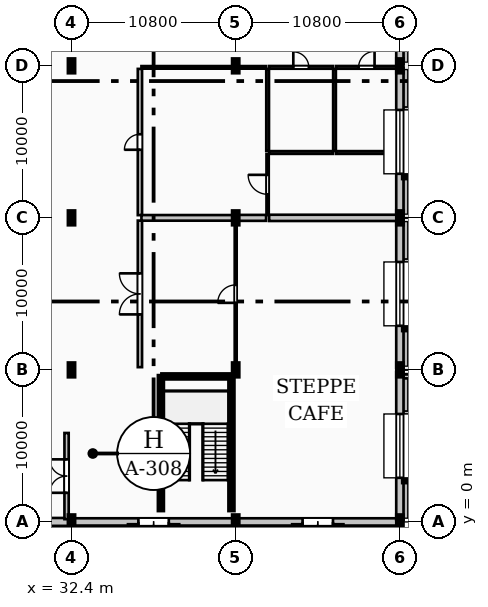
"""IFC4 building model, lengths in metres.
Left out: names, types, materials, properties, quantities, classifications, styles, units other than length and angle.
Written with IfcOpenShell. Run it as: python <this file> out.ifc"""

import sys

from ifc_helpers import new_model, si_unit, direction, frame, frame_2d, origin, origin_2d, place, context, subcontext, project, spatial, rectangle, i_section, extrude, element, fill, save


model = new_model("IFC4")
c1 = context("Model", 3, precision=1e-05, world=origin(), true_north=direction((0.0, 1.0)))
c2 = subcontext(c1, "Body", "Model", "MODEL_VIEW")
j1 = project(units=[si_unit("LENGTHUNIT", "METRE"), si_unit("PLANEANGLEUNIT", "RADIAN")], contexts=[c1])
p1 = place(None, origin())
s1 = spatial("IfcSite", under=j1, at=p1, CompositionType="ELEMENT")
p2 = place(p1, origin())
s2 = spatial("IfcBuilding", under=s1, at=p2, CompositionType="ELEMENT")
p3 = place(p2, origin())
s3 = spatial("IfcBuildingStorey", under=s2, at=p3, CompositionType="ELEMENT", Elevation=0.0)
for number, where, z_axis, x_axis in (
    (1, (32.4, 0.0, 0.0), (0.0, 0.0, 1.0), (1.0, 0.0, 0.0)),
    (2, (32.4, 10.0, 0.0), (0.0, 0.0, 1.0), (1.0, 0.0, 0.0)),
    (3, (32.4, 20.0, 0.0), (0.0, 0.0, 1.0), (1.0, 0.0, 0.0)),
    (4, (32.4, 30.0, 0.0), (0.0, 0.0, 1.0), (1.0, 0.0, 0.0)),
    (5, (43.2, 0.0, 0.0), (0.0, 0.0, 1.0), (1.0, 0.0, 0.0)),
    (6, (43.2, 10.0, 0.0), (0.0, 0.0, 1.0), (1.0, 0.0, 0.0)),
    (7, (43.2, 20.0, 0.0), (0.0, 0.0, 1.0), (1.0, 0.0, 0.0)),
    (8, (43.2, 30.0, 0.0), (0.0, 0.0, 1.0), (1.0, 0.0, 0.0)),
    (9, (54.0, 0.0, 0.0), (0.0, 0.0, 1.0), (1.0, 0.0, 0.0)),
    (10, (54.0, 10.0, 0.0), (0.0, 0.0, 1.0), (1.0, 0.0, 0.0)),
    (11, (54.0, 20.0, 0.0), (0.0, 0.0, 1.0), (1.0, 0.0, 0.0)),
    (12, (54.0, 30.0, 0.0), (0.0, 0.0, 1.0), (1.0, 0.0, 0.0)),
):
    element("IfcColumn", number, at=place(p3, frame(where, z_axis=z_axis, x_axis=x_axis)), inside=s3, PredefinedType="COLUMN", context=c2, shape_type="SweptSolid", body=[
        extrude(i_section(OverallWidth=0.3, OverallDepth=0.8, WebThickness=0.018, FlangeThickness=0.033, FilletRadius=0.03, at=origin_2d()), origin(), (0.0, 0.0, 1.0), 4.8),
    ])
for number, where, z_axis, x_axis in (
    (13, (0.2, -0.43, -1.38), (0.0, 0.0, 1.0), (1.0, 0.0, 0.0)),
    (14, (54.2, 9.57, -1.38), (0.0, 0.0, 1.0), (1.0, 0.0, 0.0)),
):
    element("IfcWall", number, at=place(p3, frame(where, z_axis=z_axis, x_axis=x_axis)), inside=s3, PredefinedType="PARAPET", context=c2, shape_type="SweptSolid", body=[
        extrude(rectangle(XDim=53.6, YDim=0.26, at=frame_2d((26.8, 0.0))), origin(), (0.0, 0.0, 1.0), 1.36),
    ])
p4 = place(p3, frame((21.745, 0.0, 0.0), z_axis=(0.0, 0.0, 1.0), x_axis=(1.0, 0.0, 0.0)))
e15 = element("IfcWall", 15, at=p4, inside=s3, PredefinedType="SOLIDWALL", context=c2, shape_type="SweptSolid", body=[
    extrude(rectangle(XDim=10.51, YDim=0.52, at=frame_2d((5.255, 0.0))), origin(), (0.0, 0.0, 1.0), 4.069),
])
p5 = place(p3, frame((32.545, 0.0, 0.0), z_axis=(0.0, 0.0, 1.0), x_axis=(1.0, 0.0, 0.0)))
e16 = element("IfcWall", 16, at=p5, inside=s3, PredefinedType="STANDARD", context=c2, shape_type="SweptSolid", body=[
    extrude(rectangle(XDim=10.51, YDim=0.48, at=frame_2d((5.255, 0.0))), origin(), (0.0, 0.0, 1.0), 4.069),
])
p6 = place(p5, frame((4.255, 0.0, 0.0)))
e17 = element("IfcOpeningElement", 17, at=p6, cuts=e16, PredefinedType="OPENING", context=c2, shape_type="SweptSolid", body=[
    extrude(rectangle(XDim=2.0, YDim=2.3, at=frame_2d((1.0, 1.15))), frame((0.0, 0.25, 0.0), z_axis=(0.0, -1.0, 0.0), x_axis=(1.0, 0.0, 0.0)), (0.0, 0.0, 1.0), 0.5),
])
p7 = place(p3, frame((43.345, 0.0, 0.0), z_axis=(0.0, 0.0, 1.0), x_axis=(1.0, 0.0, 0.0)))
e18 = element("IfcWall", 18, at=p7, inside=s3, PredefinedType="STANDARD", context=c2, shape_type="SweptSolid", body=[
    extrude(rectangle(XDim=10.51, YDim=0.48, at=frame_2d((5.255, 0.0))), origin(), (0.0, 0.0, 1.0), 4.069),
])
p8 = place(p7, frame((4.255, 0.0, 0.0)))
e19 = element("IfcOpeningElement", 19, at=p8, cuts=e18, PredefinedType="OPENING", context=c2, shape_type="SweptSolid", body=[
    extrude(rectangle(XDim=2.0, YDim=2.3, at=frame_2d((1.0, 1.15))), frame((0.0, 0.25, 0.0), z_axis=(0.0, -1.0, 0.0), x_axis=(1.0, 0.0, 0.0)), (0.0, 0.0, 1.0), 0.5),
])
p9 = place(p3, frame((54.0, 0.145, 0.0), z_axis=(0.0, 0.0, 1.0), x_axis=(0.0, 1.0, 0.0)))
e20 = element("IfcWall", 20, at=p9, inside=s3, PredefinedType="STANDARD", context=c2, shape_type="SweptSolid", body=[
    extrude(rectangle(XDim=9.71, YDim=0.48, at=frame_2d((4.855, 0.0))), origin(), (0.0, 0.0, 1.0), 4.56),
])
p10 = place(p9, frame((2.755, 0.0, 0.9)))
e21 = element("IfcOpeningElement", 21, at=p10, cuts=e20, PredefinedType="OPENING", context=c2, shape_type="SweptSolid", body=[
    extrude(rectangle(XDim=4.2, YDim=2.7, at=frame_2d((2.1, 1.35))), frame((0.0, 0.25, 0.0), z_axis=(0.0, -1.0, 0.0), x_axis=(1.0, 0.0, 0.0)), (0.0, 0.0, 1.0), 0.5),
])
p11 = place(p3, frame((54.0, 10.145, 0.0), z_axis=(0.0, 0.0, 1.0), x_axis=(0.0, 1.0, 0.0)))
e22 = element("IfcWall", 22, at=p11, inside=s3, PredefinedType="STANDARD", context=c2, shape_type="SweptSolid", body=[
    extrude(rectangle(XDim=9.71, YDim=0.48, at=frame_2d((4.855, 0.0))), origin(), (0.0, 0.0, 1.0), 4.56),
])
p12 = place(p11, frame((2.755, 0.0, 0.9)))
e23 = element("IfcOpeningElement", 23, at=p12, cuts=e22, PredefinedType="OPENING", context=c2, shape_type="SweptSolid", body=[
    extrude(rectangle(XDim=4.2, YDim=2.7, at=frame_2d((2.1, 1.35))), frame((0.0, 0.25, 0.0), z_axis=(0.0, -1.0, 0.0), x_axis=(1.0, 0.0, 0.0)), (0.0, 0.0, 1.0), 0.5),
])
p13 = place(p3, frame((54.0, 20.145, 0.0), z_axis=(0.0, 0.0, 1.0), x_axis=(0.0, 1.0, 0.0)))
e24 = element("IfcWall", 24, at=p13, inside=s3, PredefinedType="STANDARD", context=c2, shape_type="SweptSolid", body=[
    extrude(rectangle(XDim=9.71, YDim=0.48, at=frame_2d((4.855, 0.0))), origin(), (0.0, 0.0, 1.0), 4.56),
])
p14 = place(p13, frame((2.755, 0.0, 0.9)))
e25 = element("IfcOpeningElement", 25, at=p14, cuts=e24, PredefinedType="OPENING", context=c2, shape_type="SweptSolid", body=[
    extrude(rectangle(XDim=4.2, YDim=2.7, at=frame_2d((2.1, 1.35))), frame((0.0, 0.25, 0.0), z_axis=(0.0, -1.0, 0.0), x_axis=(1.0, 0.0, 0.0)), (0.0, 0.0, 1.0), 0.5),
])
p15 = place(p3, frame((54.0, 30.145, 0.0), z_axis=(0.0, 0.0, 1.0), x_axis=(0.0, 1.0, 0.0)))
e26 = element("IfcWall", 26, at=p15, inside=s3, PredefinedType="STANDARD", context=c2, shape_type="SweptSolid", body=[
    extrude(rectangle(XDim=9.71, YDim=0.48, at=frame_2d((4.855, 0.0))), origin(), (0.0, 0.0, 1.0), 4.56),
])
p16 = place(p15, frame((2.755, 0.0, 0.9)))
e27 = element("IfcOpeningElement", 27, at=p16, cuts=e26, PredefinedType="OPENING", context=c2, shape_type="SweptSolid", body=[
    extrude(rectangle(XDim=4.2, YDim=2.7, at=frame_2d((2.1, 1.35))), frame((0.0, 0.25, 0.0), z_axis=(0.0, -1.0, 0.0), x_axis=(1.0, 0.0, 0.0)), (0.0, 0.0, 1.0), 0.5),
])
for number, where, z_axis, x_axis in (
    (28, (38.28, 0.8, 0.0), (0.0, 0.0, 1.0), (0.0, 1.0, 0.0)),
    (29, (42.92, 0.8, 0.0), (0.0, 0.0, 1.0), (0.0, 1.0, 0.0)),
):
    element("IfcWall", number, at=place(p3, frame(where, z_axis=z_axis, x_axis=x_axis)), inside=s3, PredefinedType="SHEAR", context=c2, shape_type="SweptSolid", body=[
        extrude(rectangle(XDim=8.77, YDim=0.22, at=frame_2d((4.385, 0.0))), origin(), (0.0, 0.0, 1.0), 4.56),
    ])
p17 = place(p3, frame((38.4, 9.57, 0.0), z_axis=(0.0, 0.0, 1.0), x_axis=(1.0, 0.0, 0.0)))
e30 = element("IfcWall", 30, at=p17, inside=s3, PredefinedType="SHEAR", context=c2, shape_type="SweptSolid", body=[
    extrude(rectangle(XDim=4.4, YDim=0.22, at=frame_2d((2.2, 0.0))), origin(), (0.0, 0.0, 1.0), 4.56),
])
p18 = place(p3, frame((45.4, 29.9, 0.0), z_axis=(0.0, 0.0, 1.0), x_axis=(1.0, 0.0, 0.0)))
e31 = element("IfcWall", 31, at=p18, inside=s3, PredefinedType="PLUMBINGWALL", context=c2, shape_type="SweptSolid", body=[
    extrude(rectangle(XDim=4.2, YDim=0.18, at=frame_2d((2.1, 0.0))), origin(), (0.0, 0.0, 1.0), 4.069),
])
p19 = place(p18, frame((1.59, 0.0, 0.0)))
e32 = element("IfcOpeningElement", 32, at=p19, cuts=e31, PredefinedType="OPENING", context=c2, shape_type="SweptSolid", body=[
    extrude(rectangle(XDim=1.02, YDim=2.15, at=frame_2d((0.51, 1.075))), frame((0.0, 0.1, 0.0), z_axis=(0.0, -1.0, 0.0), x_axis=(1.0, 0.0, 0.0)), (0.0, 0.0, 1.0), 0.2),
])
p20 = place(p3, frame((49.8, 29.9, 0.0), z_axis=(0.0, 0.0, 1.0), x_axis=(1.0, 0.0, 0.0)))
e33 = element("IfcWall", 33, at=p20, inside=s3, PredefinedType="PLUMBINGWALL", context=c2, shape_type="SweptSolid", body=[
    extrude(rectangle(XDim=4.02, YDim=0.18, at=frame_2d((2.01, 0.0))), origin(), (0.0, 0.0, 1.0), 4.069),
])
p21 = place(p20, frame((1.485, 0.0, 0.0)))
e34 = element("IfcOpeningElement", 34, at=p21, cuts=e33, PredefinedType="OPENING", context=c2, shape_type="SweptSolid", body=[
    extrude(rectangle(XDim=1.05, YDim=2.15, at=frame_2d((0.525, 1.075))), frame((0.0, 0.1, 0.0), z_axis=(0.0, -1.0, 0.0), x_axis=(1.0, 0.0, 0.0)), (0.0, 0.0, 1.0), 0.2),
])
p22 = place(p3, frame((32.075, 0.18, 0.0), z_axis=(0.0, 0.0, 1.0), x_axis=(0.0, 1.0, 0.0)))
e35 = element("IfcWall", 35, at=p22, inside=s3, PredefinedType="SOLIDWALL", context=c2, shape_type="SweptSolid", body=[
    extrude(rectangle(XDim=5.67, YDim=0.28, at=frame_2d((2.835, 0.0))), origin(), (0.0, 0.0, 1.0), 4.52),
])
p23 = place(p22, frame((1.735, 0.0, 0.0)))
e36 = element("IfcOpeningElement", 36, at=p23, cuts=e35, PredefinedType="OPENING", context=c2, shape_type="SweptSolid", body=[
    extrude(rectangle(XDim=2.2, YDim=2.5, at=frame_2d((1.1, 1.25))), frame((0.0, 0.15, 0.0), z_axis=(0.0, -1.0, 0.0), x_axis=(1.0, 0.0, 0.0)), (0.0, 0.0, 1.0), 0.3),
])
p24 = place(p3, frame((36.9, 10.18, 0.0), z_axis=(0.0, 0.0, 1.0), x_axis=(0.0, 1.0, 0.0)))
e37 = element("IfcWall", 37, at=p24, inside=s3, PredefinedType="SOLIDWALL", context=c2, shape_type="SweptSolid", body=[
    extrude(rectangle(XDim=9.64, YDim=0.28, at=frame_2d((4.82, 0.0))), origin(), (0.0, 0.0, 1.0), 4.52),
])
p25 = place(p24, frame((3.47, 0.0, 0.0)))
e38 = element("IfcOpeningElement", 38, at=p25, cuts=e37, PredefinedType="OPENING", context=c2, shape_type="SweptSolid", body=[
    extrude(rectangle(XDim=2.7, YDim=2.85, at=frame_2d((1.35, 1.425))), frame((0.0, 0.15, 0.0), z_axis=(0.0, -1.0, 0.0), x_axis=(1.0, 0.0, 0.0)), (0.0, 0.0, 1.0), 0.3),
])
p26 = place(p3, frame((36.9, 20.18, 0.0), z_axis=(0.0, 0.0, 1.0), x_axis=(0.0, 1.0, 0.0)))
e39 = element("IfcWall", 39, at=p26, inside=s3, PredefinedType="SOLIDWALL", context=c2, shape_type="SweptSolid", body=[
    extrude(rectangle(XDim=9.62, YDim=0.28, at=frame_2d((4.81, 0.0))), origin(), (0.0, 0.0, 1.0), 4.52),
])
p27 = place(p26, frame((4.3, 0.0, 0.0)))
e40 = element("IfcOpeningElement", 40, at=p27, cuts=e39, PredefinedType="OPENING", context=c2, shape_type="SweptSolid", body=[
    extrude(rectangle(XDim=1.02, YDim=2.18, at=frame_2d((0.51, 1.09))), frame((0.0, 0.15, 0.0), z_axis=(0.0, -1.0, 0.0), x_axis=(1.0, 0.0, 0.0)), (0.0, 0.0, 1.0), 0.3),
])
p28 = place(p3, frame((43.2, 10.18, 0.0), z_axis=(0.0, 0.0, 1.0), x_axis=(0.0, 1.0, 0.0)))
e41 = element("IfcWall", 41, at=p28, inside=s3, PredefinedType="PARTITIONING", context=c2, shape_type="SweptSolid", body=[
    extrude(rectangle(XDim=9.64, YDim=0.13, at=frame_2d((4.82, 0.0))), origin(), (0.0, 0.0, 1.0), 4.06),
])
p29 = place(p28, frame((4.23, 0.0, 0.0)))
e42 = element("IfcOpeningElement", 42, at=p29, cuts=e41, PredefinedType="OPENING", context=c2, shape_type="SweptSolid", body=[
    extrude(rectangle(XDim=1.18, YDim=2.28, at=frame_2d((0.59, 1.14))), frame((0.0, 0.075, 0.0), z_axis=(0.0, -1.0, 0.0), x_axis=(1.0, 0.0, 0.0)), (0.0, 0.0, 1.0), 0.15),
])
p30 = place(p3, frame((45.3, 20.18, 0.0), z_axis=(0.0, 0.0, 1.0), x_axis=(0.0, 1.0, 0.0)))
e43 = element("IfcWall", 43, at=p30, inside=s3, PredefinedType="PARTITIONING", context=c2, shape_type="SweptSolid", body=[
    extrude(rectangle(XDim=4.02, YDim=0.15, at=frame_2d((2.01, 0.0))), origin(), (0.0, 0.0, 1.0), 4.52),
])
p31 = place(p30, frame((1.37, 0.0, 0.0)))
e44 = element("IfcOpeningElement", 44, at=p31, cuts=e43, PredefinedType="OPENING", context=c2, shape_type="SweptSolid", body=[
    extrude(rectangle(XDim=1.28, YDim=2.32, at=frame_2d((0.64, 1.16))), frame((0.0, 0.085, 0.0), z_axis=(0.0, -1.0, 0.0), x_axis=(1.0, 0.0, 0.0)), (0.0, 0.0, 1.0), 0.17),
])
p32 = place(p3, frame((37.0, 20.0, 0.0), z_axis=(0.0, 0.0, 1.0), x_axis=(1.0, 0.0, 0.0)))
e45 = element("IfcWall", 45, at=p32, inside=s3, PredefinedType="PARTITIONING", context=c2, shape_type="SweptSolid", body=[
    extrude(rectangle(XDim=6.02, YDim=0.37, at=frame_2d((3.01, 0.0))), origin(), (0.0, 0.0, 1.0), 4.069),
])
p33 = place(p3, frame((43.38, 20.0, 0.0), z_axis=(0.0, 0.0, 1.0), x_axis=(1.0, 0.0, 0.0)))
e46 = element("IfcWall", 46, at=p33, inside=s3, PredefinedType="PARTITIONING", context=c2, shape_type="SweptSolid", body=[
    extrude(rectangle(XDim=1.82, YDim=0.39, at=frame_2d((0.91, 0.0))), origin(), (0.0, 0.0, 1.0), 4.069),
])
p34 = place(p3, frame((45.4, 20.0, 0.0), z_axis=(0.0, 0.0, 1.0), x_axis=(1.0, 0.0, 0.0)))
e47 = element("IfcWall", 47, at=p34, inside=s3, PredefinedType="PARTITIONING", context=c2, shape_type="SweptSolid", body=[
    extrude(rectangle(XDim=8.42, YDim=0.41, at=frame_2d((4.21, 0.0))), origin(), (0.0, 0.0, 1.0), 4.069),
])
p35 = place(p3, frame((45.4, 24.3, 0.0), z_axis=(0.0, 0.0, 1.0), x_axis=(1.0, 0.0, 0.0)))
e48 = element("IfcWall", 48, at=p35, inside=s3, PredefinedType="PLUMBINGWALL", context=c2, shape_type="SweptSolid", body=[
    extrude(rectangle(XDim=4.2, YDim=0.18, at=frame_2d((2.1, 0.0))), origin(), (0.0, 0.0, 1.0), 4.52),
])
p36 = place(p3, frame((49.8, 24.3, 0.0), z_axis=(0.0, 0.0, 1.0), x_axis=(1.0, 0.0, 0.0)))
e49 = element("IfcWall", 49, at=p36, inside=s3, PredefinedType="PLUMBINGWALL", context=c2, shape_type="SweptSolid", body=[
    extrude(rectangle(XDim=4.02, YDim=0.18, at=frame_2d((2.01, 0.0))), origin(), (0.0, 0.0, 1.0), 4.52),
])
p37 = place(p3, frame((37.0, 29.9, 0.0), z_axis=(0.0, 0.0, 1.0), x_axis=(1.0, 0.0, 0.0)))
e50 = element("IfcWall", 50, at=p37, inside=s3, PredefinedType="PARTITIONING", context=c2, shape_type="SweptSolid", body=[
    extrude(rectangle(XDim=6.0, YDim=0.17, at=frame_2d((3.0, 0.0))), origin(), (0.0, 0.0, 1.0), 4.069),
])
p38 = place(p3, frame((43.4, 29.9, 0.0), z_axis=(0.0, 0.0, 1.0), x_axis=(1.0, 0.0, 0.0)))
e51 = element("IfcWall", 51, at=p38, inside=s3, PredefinedType="PARTITIONING", context=c2, shape_type="SweptSolid", body=[
    extrude(rectangle(XDim=1.8, YDim=0.17, at=frame_2d((0.9, 0.0))), origin(), (0.0, 0.0, 1.0), 4.069),
])
for number, where, z_axis, x_axis in (
    (52, (45.3, 24.4, 0.0), (0.0, 0.0, 1.0), (0.0, 1.0, 0.0)),
    (53, (49.7, 24.4, 0.0), (0.0, 0.0, 1.0), (0.0, 1.0, 0.0)),
):
    element("IfcWall", number, at=place(p3, frame(where, z_axis=z_axis, x_axis=x_axis)), inside=s3, PredefinedType="PLUMBINGWALL", context=c2, shape_type="SweptSolid", body=[
        extrude(rectangle(XDim=5.4, YDim=0.18, at=frame_2d((2.7, 0.0))), origin(), (0.0, 0.0, 1.0), 4.52),
    ])
p39 = place(p6, frame((2.0, 0.0, 0.0), z_axis=(0.0, 0.0, 1.0), x_axis=(-1.0, 0.0, 0.0)))
e54 = element("IfcDoor", 54, at=p39, inside=s3, OperationType="DOUBLE_DOOR_SINGLE_SWING", PredefinedType="DOOR", context=c2, shape_type="SweptSolid", body=[
    extrude(rectangle(XDim=2.0, YDim=2.3, at=frame_2d((1.0, 1.15))), frame((0.0, 0.025, 0.0), z_axis=(0.0, -1.0, 0.0), x_axis=(1.0, 0.0, 0.0)), (0.0, 0.0, 1.0), 0.05),
])
fill(e17, e54)
p40 = place(p8, frame((2.0, 0.0, 0.0), z_axis=(0.0, 0.0, 1.0), x_axis=(-1.0, 0.0, 0.0)))
e55 = element("IfcDoor", 55, at=p40, inside=s3, OperationType="DOUBLE_DOOR_SINGLE_SWING", PredefinedType="DOOR", context=c2, shape_type="SweptSolid", body=[
    extrude(rectangle(XDim=2.0, YDim=2.3, at=frame_2d((1.0, 1.15))), frame((0.0, 0.025, 0.0), z_axis=(0.0, -1.0, 0.0), x_axis=(1.0, 0.0, 0.0)), (0.0, 0.0, 1.0), 0.05),
])
fill(e19, e55)
p41 = place(p10, origin())
e56 = element("IfcWindow", 56, at=p41, inside=s3, PartitioningType="SINGLE_PANEL", PredefinedType="WINDOW", context=c2, shape_type="SweptSolid", body=[
    extrude(rectangle(XDim=4.2, YDim=2.7, at=frame_2d((2.1, 1.35))), frame((0.0, 0.03, 0.0), z_axis=(0.0, -1.0, 0.0), x_axis=(1.0, 0.0, 0.0)), (0.0, 0.0, 1.0), 0.06),
])
fill(e21, e56)
p42 = place(p12, origin())
e57 = element("IfcWindow", 57, at=p42, inside=s3, PartitioningType="SINGLE_PANEL", PredefinedType="WINDOW", context=c2, shape_type="SweptSolid", body=[
    extrude(rectangle(XDim=4.2, YDim=2.7, at=frame_2d((2.1, 1.35))), frame((0.0, 0.03, 0.0), z_axis=(0.0, -1.0, 0.0), x_axis=(1.0, 0.0, 0.0)), (0.0, 0.0, 1.0), 0.06),
])
fill(e23, e57)
p43 = place(p14, origin())
e58 = element("IfcWindow", 58, at=p43, inside=s3, PartitioningType="SINGLE_PANEL", PredefinedType="WINDOW", context=c2, shape_type="SweptSolid", body=[
    extrude(rectangle(XDim=4.2, YDim=2.7, at=frame_2d((2.1, 1.35))), frame((0.0, 0.03, 0.0), z_axis=(0.0, -1.0, 0.0), x_axis=(1.0, 0.0, 0.0)), (0.0, 0.0, 1.0), 0.06),
])
fill(e25, e58)
p44 = place(p19, origin())
e59 = element("IfcDoor", 59, at=p44, inside=s3, OperationType="SINGLE_SWING_LEFT", PredefinedType="DOOR", context=c2, shape_type="SweptSolid", body=[
    extrude(rectangle(XDim=1.02, YDim=2.15, at=frame_2d((0.51, 1.075))), frame((0.0, 0.025, 0.0), z_axis=(0.0, -1.0, 0.0), x_axis=(1.0, 0.0, 0.0)), (0.0, 0.0, 1.0), 0.05),
])
fill(e32, e59)
p45 = place(p21, origin())
e60 = element("IfcDoor", 60, at=p45, inside=s3, OperationType="SINGLE_SWING_RIGHT", PredefinedType="DOOR", context=c2, shape_type="SweptSolid", body=[
    extrude(rectangle(XDim=1.05, YDim=2.15, at=frame_2d((0.525, 1.075))), frame((0.0, 0.025, 0.0), z_axis=(0.0, -1.0, 0.0), x_axis=(1.0, 0.0, 0.0)), (0.0, 0.0, 1.0), 0.05),
])
fill(e34, e60)
p46 = place(p23, origin())
e61 = element("IfcDoor", 61, at=p46, inside=s3, OperationType="DOUBLE_DOOR_SINGLE_SWING", PredefinedType="DOOR", context=c2, shape_type="SweptSolid", body=[
    extrude(rectangle(XDim=2.2, YDim=2.5, at=frame_2d((1.1, 1.25))), frame((0.0, 0.025, 0.0), z_axis=(0.0, -1.0, 0.0), x_axis=(1.0, 0.0, 0.0)), (0.0, 0.0, 1.0), 0.05),
])
fill(e36, e61)
p47 = place(p25, origin())
e62 = element("IfcDoor", 62, at=p47, inside=s3, OperationType="DOUBLE_DOOR_SINGLE_SWING", PredefinedType="DOOR", context=c2, shape_type="SweptSolid", body=[
    extrude(rectangle(XDim=2.7, YDim=2.85, at=frame_2d((1.35, 1.425))), frame((0.0, 0.025, 0.0), z_axis=(0.0, -1.0, 0.0), x_axis=(1.0, 0.0, 0.0)), (0.0, 0.0, 1.0), 0.05),
])
fill(e38, e62)
p48 = place(p27, origin())
e63 = element("IfcDoor", 63, at=p48, inside=s3, OperationType="SINGLE_SWING_LEFT", PredefinedType="DOOR", context=c2, shape_type="SweptSolid", body=[
    extrude(rectangle(XDim=1.02, YDim=2.18, at=frame_2d((0.51, 1.09))), frame((0.0, 0.025, 0.0), z_axis=(0.0, -1.0, 0.0), x_axis=(1.0, 0.0, 0.0)), (0.0, 0.0, 1.0), 0.05),
])
fill(e40, e63)
p49 = place(p29, origin())
e64 = element("IfcDoor", 64, at=p49, inside=s3, OperationType="SINGLE_SWING_LEFT", PredefinedType="DOOR", context=c2, shape_type="SweptSolid", body=[
    extrude(rectangle(XDim=1.18, YDim=2.28, at=frame_2d((0.59, 1.14))), frame((0.0, 0.025, 0.0), z_axis=(0.0, -1.0, 0.0), x_axis=(1.0, 0.0, 0.0)), (0.0, 0.0, 1.0), 0.05),
])
fill(e42, e64)
p50 = place(p31, origin())
e65 = element("IfcDoor", 65, at=p50, inside=s3, OperationType="SINGLE_SWING_RIGHT", PredefinedType="DOOR", context=c2, shape_type="SweptSolid", body=[
    extrude(rectangle(XDim=1.28, YDim=2.32, at=frame_2d((0.64, 1.16))), frame((0.0, 0.025, 0.0), z_axis=(0.0, -1.0, 0.0), x_axis=(1.0, 0.0, 0.0)), (0.0, 0.0, 1.0), 0.05),
])
fill(e44, e65)
save(model, sys.argv[1])
